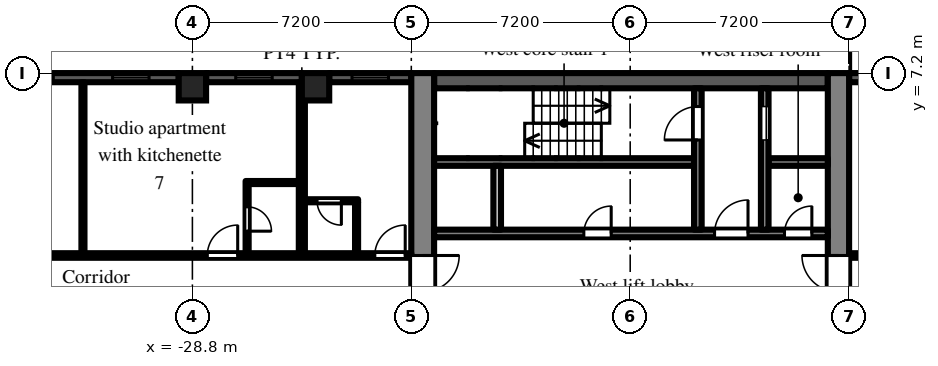
"""IFC4 building model, lengths in metres.
Left out: names, types, materials, properties, quantities, classifications, styles, units other than length and angle.
Written with IfcOpenShell. Run it as: python <this file> out.ifc"""

import sys

from ifc_helpers import new_model, si_unit, direction, frame, frame_2d, origin, origin_2d, place, context, subcontext, project, spatial, rectangle, extrude, element, fill, save


model = new_model("IFC4")
c1 = context("Model", 3, precision=1e-05, world=origin(), true_north=direction((0.0, 1.0)))
c2 = subcontext(c1, "Body", "Model", "MODEL_VIEW")
j1 = project(units=[si_unit("LENGTHUNIT", "METRE"), si_unit("PLANEANGLEUNIT", "RADIAN")], contexts=[c1])
p1 = place(None, origin())
s1 = spatial("IfcSite", under=j1, at=p1, CompositionType="ELEMENT")
p2 = place(p1, origin())
s2 = spatial("IfcBuilding", under=s1, at=p2, CompositionType="ELEMENT")
p3 = place(p2, frame((0.0, 0.0, 66.9)))
s3 = spatial("IfcBuildingStorey", under=s2, at=p3, CompositionType="ELEMENT", Elevation=66.9)
for number, where, z_axis, x_axis in (
    (1, (-28.8, 6.75, 0.0), (0.0, 0.0, 1.0), (1.0, 0.0, 0.0)),
    (2, (-24.75, 6.75, 0.0), (0.0, 0.0, 1.0), (1.0, 0.0, 0.0)),
):
    element("IfcColumn", number, at=place(p3, frame(where, z_axis=z_axis, x_axis=x_axis)), inside=s3, PredefinedType="COLUMN", context=c2, shape_type="SweptSolid", body=[
        extrude(rectangle(XDim=0.9, YDim=0.9, at=origin_2d()), origin(), (0.0, 0.0, 1.0), 3.0),
    ])
p4 = place(p3, frame((-4.2, 7.05, 0.0), z_axis=(0.0, 0.0, 1.0), x_axis=(-1.0, 0.0, 0.0)))
e3 = element("IfcWall", 3, at=p4, inside=s3, PredefinedType="SOLIDWALL", context=c2, shape_type="SweptSolid", body=[
    extrude(rectangle(XDim=3.0, YDim=0.3, at=frame_2d((1.5, 0.0))), origin(), (0.0, 0.0, 1.0), 2.1),
])
p5 = place(p3, frame((-21.6, 7.05, 0.0), z_axis=(0.0, 0.0, 1.0), x_axis=(-1.0, 0.0, 0.0)))
e4 = element("IfcWall", 4, at=p5, inside=s3, PredefinedType="SOLIDWALL", context=c2, shape_type="SweptSolid", body=[
    extrude(rectangle(XDim=2.7, YDim=0.3, at=frame_2d((1.35, 0.0))), origin(), (0.0, 0.0, 1.0), 2.1),
])
p6 = place(p5, frame((0.75, 0.0, 0.2)))
e5 = element("IfcOpeningElement", 5, at=p6, cuts=e4, PredefinedType="OPENING", context=c2, shape_type="SweptSolid", body=[
    extrude(rectangle(XDim=1.2, YDim=1.85, at=frame_2d((0.6, 0.925))), frame((0.0, 0.16, 0.0), z_axis=(0.0, -1.0, 0.0), x_axis=(1.0, 0.0, 0.0)), (0.0, 0.0, 1.0), 0.32),
])
p7 = place(p3, frame((-25.2, 7.05, 0.0), z_axis=(0.0, 0.0, 1.0), x_axis=(-1.0, 0.0, 0.0)))
e6 = element("IfcWall", 6, at=p7, inside=s3, PredefinedType="SOLIDWALL", context=c2, shape_type="SweptSolid", body=[
    extrude(rectangle(XDim=3.15, YDim=0.3, at=frame_2d((1.575, 0.0))), origin(), (0.0, 0.0, 1.0), 2.1),
])
p8 = place(p7, frame((0.975, 0.0, 0.2)))
e7 = element("IfcOpeningElement", 7, at=p8, cuts=e6, PredefinedType="OPENING", context=c2, shape_type="SweptSolid", body=[
    extrude(rectangle(XDim=1.2, YDim=1.85, at=frame_2d((0.6, 0.925))), frame((0.0, 0.16, 0.0), z_axis=(0.0, -1.0, 0.0), x_axis=(1.0, 0.0, 0.0)), (0.0, 0.0, 1.0), 0.32),
])
p9 = place(p3, frame((-29.25, 7.05, 0.0), z_axis=(0.0, 0.0, 1.0), x_axis=(-1.0, 0.0, 0.0)))
e8 = element("IfcWall", 8, at=p9, inside=s3, PredefinedType="SOLIDWALL", context=c2, shape_type="SweptSolid", body=[
    extrude(rectangle(XDim=6.3, YDim=0.3, at=frame_2d((3.15, 0.0))), origin(), (0.0, 0.0, 1.0), 2.1),
])
p10 = place(p9, frame((0.975, 0.0, 0.2)))
e9 = element("IfcOpeningElement", 9, at=p10, cuts=e8, PredefinedType="OPENING", context=c2, shape_type="SweptSolid", body=[
    extrude(rectangle(XDim=1.2, YDim=1.85, at=frame_2d((0.6, 0.925))), frame((0.0, 0.16, 0.0), z_axis=(0.0, -1.0, 0.0), x_axis=(1.0, 0.0, 0.0)), (0.0, 0.0, 1.0), 0.32),
])
p11 = place(p9, frame((4.125, 0.0, 0.2)))
e10 = element("IfcOpeningElement", 10, at=p11, cuts=e8, PredefinedType="OPENING", context=c2, shape_type="SweptSolid", body=[
    extrude(rectangle(XDim=1.2, YDim=1.85, at=frame_2d((0.6, 0.925))), frame((0.0, 0.16, 0.0), z_axis=(0.0, -1.0, 0.0), x_axis=(1.0, 0.0, 0.0)), (0.0, 0.0, 1.0), 0.32),
])
p12 = place(p3, frame((-7.55, -7.2, 0.0), z_axis=(0.0, 0.0, 1.0), x_axis=(0.0, 1.0, 0.0)))
e11 = element("IfcWall", 11, at=p12, inside=s3, PredefinedType="SHEAR", context=c2, shape_type="SweptSolid", body=[
    extrude(rectangle(XDim=14.4, YDim=0.7, at=frame_2d((7.2, 0.0))), origin(), (0.0, 0.0, 1.0), 2.575),
])
p13 = place(p12, frame((6.0, 0.0, 0.0)))
e12 = element("IfcOpeningElement", 12, at=p13, cuts=e11, PredefinedType="OPENING", context=c2, shape_type="SweptSolid", body=[
    extrude(rectangle(XDim=2.4, YDim=2.2, at=frame_2d((1.2, 1.1))), frame((0.0, 0.36, 0.0), z_axis=(0.0, -1.0, 0.0), x_axis=(1.0, 0.0, 0.0)), (0.0, 0.0, 1.0), 0.72),
])
p14 = place(p3, frame((-21.225, -7.2, 0.0), z_axis=(0.0, 0.0, 1.0), x_axis=(0.0, 1.0, 0.0)))
e13 = element("IfcWall", 13, at=p14, inside=s3, PredefinedType="SHEAR", context=c2, shape_type="SweptSolid", body=[
    extrude(rectangle(XDim=14.4, YDim=0.75, at=frame_2d((7.2, 0.0))), origin(), (0.0, 0.0, 1.0), 2.575),
])
p15 = place(p14, frame((6.0, 0.0, 0.0)))
e14 = element("IfcOpeningElement", 14, at=p15, cuts=e13, PredefinedType="OPENING", context=c2, shape_type="SweptSolid", body=[
    extrude(rectangle(XDim=2.4, YDim=2.2, at=frame_2d((1.2, 1.1))), frame((0.0, 0.385, 0.0), z_axis=(0.0, -1.0, 0.0), x_axis=(1.0, 0.0, 0.0)), (0.0, 0.0, 1.0), 0.77),
])
p16 = place(p3, frame((-7.9, 6.95, 0.0), z_axis=(0.0, 0.0, 1.0), x_axis=(-1.0, 0.0, 0.0)))
e15 = element("IfcWall", 15, at=p16, inside=s3, PredefinedType="SHEAR", context=c2, shape_type="SweptSolid", body=[
    extrude(rectangle(XDim=12.95, YDim=0.5, at=frame_2d((6.475, 0.0))), origin(), (0.0, 0.0, 1.0), 2.575),
])
p17 = place(p3, frame((-7.9, 1.925, 0.0), z_axis=(0.0, 0.0, 1.0), x_axis=(-1.0, 0.0, 0.0)))
e16 = element("IfcWall", 16, at=p17, inside=s3, PredefinedType="SHEAR", context=c2, shape_type="SweptSolid", body=[
    extrude(rectangle(XDim=12.95, YDim=0.25, at=frame_2d((6.475, 0.0))), origin(), (0.0, 0.0, 1.0), 2.575),
])
p18 = place(p17, frame((0.525, 0.0, 0.0)))
e17 = element("IfcOpeningElement", 17, at=p18, cuts=e16, PredefinedType="OPENING", context=c2, shape_type="SweptSolid", body=[
    extrude(rectangle(XDim=0.9, YDim=2.1, at=frame_2d((0.45, 1.05))), frame((0.0, 0.135, 0.0), z_axis=(0.0, -1.0, 0.0), x_axis=(1.0, 0.0, 0.0)), (0.0, 0.0, 1.0), 0.27),
])
p19 = place(p17, frame((2.625, 0.0, 0.0)))
e18 = element("IfcOpeningElement", 18, at=p19, cuts=e16, PredefinedType="OPENING", context=c2, shape_type="SweptSolid", body=[
    extrude(rectangle(XDim=1.1, YDim=2.1, at=frame_2d((0.55, 1.05))), frame((0.0, 0.135, 0.0), z_axis=(0.0, -1.0, 0.0), x_axis=(1.0, 0.0, 0.0)), (0.0, 0.0, 1.0), 0.27),
])
p20 = place(p17, frame((7.125, 0.0, 0.0)))
e19 = element("IfcOpeningElement", 19, at=p20, cuts=e16, PredefinedType="OPENING", context=c2, shape_type="SweptSolid", body=[
    extrude(rectangle(XDim=0.9, YDim=2.1, at=frame_2d((0.45, 1.05))), frame((0.0, 0.135, 0.0), z_axis=(0.0, -1.0, 0.0), x_axis=(1.0, 0.0, 0.0)), (0.0, 0.0, 1.0), 0.27),
])
p21 = place(p3, frame((-7.9, 4.275, 0.0), z_axis=(0.0, 0.0, 1.0), x_axis=(-1.0, 0.0, 0.0)))
e20 = element("IfcWall", 20, at=p21, inside=s3, PredefinedType="SHEAR", context=c2, shape_type="SweptSolid", body=[
    extrude(rectangle(XDim=1.95, YDim=0.25, at=frame_2d((0.975, 0.0))), origin(), (0.0, 0.0, 1.0), 2.575),
])
p22 = place(p3, frame((-12.3, 4.275, 0.0), z_axis=(0.0, 0.0, 1.0), x_axis=(-1.0, 0.0, 0.0)))
e21 = element("IfcWall", 21, at=p22, inside=s3, PredefinedType="SHEAR", context=c2, shape_type="SweptSolid", body=[
    extrude(rectangle(XDim=8.55, YDim=0.25, at=frame_2d((4.275, 0.0))), origin(), (0.0, 0.0, 1.0), 2.575),
])
p23 = place(p3, frame((-9.975, 2.05, 0.0), z_axis=(0.0, 0.0, 1.0), x_axis=(0.0, 1.0, 0.0)))
e22 = element("IfcWall", 22, at=p23, inside=s3, PredefinedType="SHEAR", context=c2, shape_type="SweptSolid", body=[
    extrude(rectangle(XDim=4.65, YDim=0.25, at=frame_2d((2.325, 0.0))), origin(), (0.0, 0.0, 1.0), 2.575),
])
p24 = place(p23, frame((2.95, 0.0, 0.0)))
e23 = element("IfcOpeningElement", 23, at=p24, cuts=e22, PredefinedType="OPENING", context=c2, shape_type="SweptSolid", body=[
    extrude(rectangle(XDim=1.1, YDim=2.1, at=frame_2d((0.55, 1.05))), frame((0.0, 0.135, 0.0), z_axis=(0.0, -1.0, 0.0), x_axis=(1.0, 0.0, 0.0)), (0.0, 0.0, 1.0), 0.27),
])
p25 = place(p3, frame((-12.175, 2.05, 0.0), z_axis=(0.0, 0.0, 1.0), x_axis=(0.0, 1.0, 0.0)))
e24 = element("IfcWall", 24, at=p25, inside=s3, PredefinedType="SHEAR", context=c2, shape_type="SweptSolid", body=[
    extrude(rectangle(XDim=4.65, YDim=0.25, at=frame_2d((2.325, 0.0))), origin(), (0.0, 0.0, 1.0), 2.575),
])
p26 = place(p25, frame((2.95, 0.0, 0.0)))
e25 = element("IfcOpeningElement", 25, at=p26, cuts=e24, PredefinedType="OPENING", context=c2, shape_type="SweptSolid", body=[
    extrude(rectangle(XDim=1.1, YDim=2.1, at=frame_2d((0.55, 1.05))), frame((0.0, 0.135, 0.0), z_axis=(0.0, -1.0, 0.0), x_axis=(1.0, 0.0, 0.0)), (0.0, 0.0, 1.0), 0.27),
])
p27 = place(p3, frame((-18.775, 2.05, 0.0), z_axis=(0.0, 0.0, 1.0), x_axis=(0.0, 1.0, 0.0)))
e26 = element("IfcWall", 26, at=p27, inside=s3, PredefinedType="PARTITIONING", context=c2, shape_type="SweptSolid", body=[
    extrude(rectangle(XDim=2.1, YDim=0.25, at=frame_2d((1.05, 0.0))), origin(), (0.0, 0.0, 1.0), 2.575),
])
p28 = place(p3, frame((-36.5, 1.2, 0.0), z_axis=(0.0, 0.0, 1.0), x_axis=(1.0, 0.0, 0.0)))
e27 = element("IfcWall", 27, at=p28, inside=s3, PredefinedType="PARTITIONING", context=c2, shape_type="SweptSolid", body=[
    extrude(rectangle(XDim=14.9, YDim=0.15, at=frame_2d((7.45, 0.0))), origin(), (0.0, 0.0, 1.0), 2.575),
])
p29 = place(p28, frame((13.7, 0.0, 0.0)))
e28 = element("IfcOpeningElement", 28, at=p29, cuts=e27, PredefinedType="OPENING", context=c2, shape_type="SweptSolid", body=[
    extrude(rectangle(XDim=1.0, YDim=2.1, at=frame_2d((0.5, 1.05))), frame((0.0, 0.085, 0.0), z_axis=(0.0, -1.0, 0.0), x_axis=(1.0, 0.0, 0.0)), (0.0, 0.0, 1.0), 0.17),
])
p30 = place(p28, frame((8.19, 0.0, 0.0)))
e29 = element("IfcOpeningElement", 29, at=p30, cuts=e27, PredefinedType="OPENING", context=c2, shape_type="SweptSolid", body=[
    extrude(rectangle(XDim=1.0, YDim=2.1, at=frame_2d((0.5, 1.05))), frame((0.0, 0.085, 0.0), z_axis=(0.0, -1.0, 0.0), x_axis=(1.0, 0.0, 0.0)), (0.0, 0.0, 1.0), 0.17),
])
p31 = place(p28, frame((1.15, 0.0, 0.0)))
e30 = element("IfcOpeningElement", 30, at=p31, cuts=e27, PredefinedType="OPENING", context=c2, shape_type="SweptSolid", body=[
    extrude(rectangle(XDim=1.8, YDim=2.1, at=frame_2d((0.9, 1.05))), frame((0.0, 0.085, 0.0), z_axis=(0.0, -1.0, 0.0), x_axis=(1.0, 0.0, 0.0)), (0.0, 0.0, 1.0), 0.17),
])
p32 = place(p3, frame((-32.4, 1.275, 0.0), z_axis=(0.0, 0.0, 1.0), x_axis=(0.0, 1.0, 0.0)))
e31 = element("IfcWall", 31, at=p32, inside=s3, PredefinedType="PARTITIONING", context=c2, shape_type="SweptSolid", body=[
    extrude(rectangle(XDim=5.625, YDim=0.1, at=frame_2d((2.812, 0.0))), origin(), (0.0, 0.0, 1.0), 2.575),
])
p33 = place(p3, frame((-27.0, 1.275, 0.0), z_axis=(0.0, 0.0, 1.0), x_axis=(0.0, 1.0, 0.0)))
e32 = element("IfcWall", 32, at=p33, inside=s3, PredefinedType="PARTITIONING", context=c2, shape_type="SweptSolid", body=[
    extrude(rectangle(XDim=2.375, YDim=0.1, at=frame_2d((1.188, 0.0))), origin(), (0.0, 0.0, 1.0), 2.575),
])
p34 = place(p33, frame((0.725, 0.0, 0.0)))
e33 = element("IfcOpeningElement", 33, at=p34, cuts=e32, PredefinedType="OPENING", context=c2, shape_type="SweptSolid", body=[
    extrude(rectangle(XDim=0.8, YDim=2.1, at=frame_2d((0.4, 1.05))), frame((0.0, 0.06, 0.0), z_axis=(0.0, -1.0, 0.0), x_axis=(1.0, 0.0, 0.0)), (0.0, 0.0, 1.0), 0.12),
])
p35 = place(p3, frame((-26.95, 3.6, 0.0), z_axis=(0.0, 0.0, 1.0), x_axis=(1.0, 0.0, 0.0)))
e34 = element("IfcWall", 34, at=p35, inside=s3, PredefinedType="PARTITIONING", context=c2, shape_type="SweptSolid", body=[
    extrude(rectangle(XDim=1.65, YDim=0.1, at=frame_2d((0.825, 0.0))), origin(), (0.0, 0.0, 1.0), 2.575),
])
p36 = place(p3, frame((-25.2, 1.275, 0.0), z_axis=(0.0, 0.0, 1.0), x_axis=(0.0, 1.0, 0.0)))
e35 = element("IfcWall", 35, at=p36, inside=s3, PredefinedType="PARTITIONING", context=c2, shape_type="SweptSolid", body=[
    extrude(rectangle(XDim=5.625, YDim=0.2, at=frame_2d((2.812, 0.0))), origin(), (0.0, 0.0, 1.0), 2.575),
])
p37 = place(p3, frame((-25.1, 3.0, 0.0), z_axis=(0.0, 0.0, 1.0), x_axis=(1.0, 0.0, 0.0)))
e36 = element("IfcWall", 36, at=p37, inside=s3, PredefinedType="PARTITIONING", context=c2, shape_type="SweptSolid", body=[
    extrude(rectangle(XDim=1.75, YDim=0.1, at=frame_2d((0.875, 0.0))), origin(), (0.0, 0.0, 1.0), 2.575),
])
p38 = place(p37, frame((0.4, 0.0, 0.0)))
e37 = element("IfcOpeningElement", 37, at=p38, cuts=e36, PredefinedType="OPENING", context=c2, shape_type="SweptSolid", body=[
    extrude(rectangle(XDim=0.8, YDim=2.1, at=frame_2d((0.4, 1.05))), frame((0.0, 0.06, 0.0), z_axis=(0.0, -1.0, 0.0), x_axis=(1.0, 0.0, 0.0)), (0.0, 0.0, 1.0), 0.12),
])
p39 = place(p3, frame((-23.4, 1.275, 0.0), z_axis=(0.0, 0.0, 1.0), x_axis=(0.0, 1.0, 0.0)))
e38 = element("IfcWall", 38, at=p39, inside=s3, PredefinedType="PARTITIONING", context=c2, shape_type="SweptSolid", body=[
    extrude(rectangle(XDim=1.675, YDim=0.1, at=frame_2d((0.837, 0.0))), origin(), (0.0, 0.0, 1.0), 2.575),
])
p40 = place(p3, frame((-7.2, 1.2, 0.0), z_axis=(0.0, 0.0, 1.0), x_axis=(1.0, 0.0, 0.0)))
e39 = element("IfcWall", 39, at=p40, inside=s3, PredefinedType="PARTITIONING", context=c2, shape_type="SweptSolid", body=[
    extrude(rectangle(XDim=6.075, YDim=0.15, at=frame_2d((3.038, 0.0))), origin(), (0.0, 0.0, 1.0), 2.575),
])
p41 = place(p40, frame((1.95, 0.0, 0.0)))
e40 = element("IfcOpeningElement", 40, at=p41, cuts=e39, PredefinedType="OPENING", context=c2, shape_type="SweptSolid", body=[
    extrude(rectangle(XDim=0.9, YDim=2.1, at=frame_2d((0.45, 1.05))), frame((0.0, 0.085, 0.0), z_axis=(0.0, -1.0, 0.0), x_axis=(1.0, 0.0, 0.0)), (0.0, 0.0, 1.0), 0.17),
])
p42 = place(p6, origin())
e41 = element("IfcWindow", 41, at=p42, inside=s3, PartitioningType="SINGLE_PANEL", PredefinedType="WINDOW", context=c2, shape_type="SweptSolid", body=[
    extrude(rectangle(XDim=1.2, YDim=1.85, at=frame_2d((0.6, 0.925))), frame((0.0, 0.03, 0.0), z_axis=(0.0, -1.0, 0.0), x_axis=(1.0, 0.0, 0.0)), (0.0, 0.0, 1.0), 0.06),
])
fill(e5, e41)
p43 = place(p8, origin())
e42 = element("IfcWindow", 42, at=p43, inside=s3, PartitioningType="SINGLE_PANEL", PredefinedType="WINDOW", context=c2, shape_type="SweptSolid", body=[
    extrude(rectangle(XDim=1.2, YDim=1.85, at=frame_2d((0.6, 0.925))), frame((0.0, 0.03, 0.0), z_axis=(0.0, -1.0, 0.0), x_axis=(1.0, 0.0, 0.0)), (0.0, 0.0, 1.0), 0.06),
])
fill(e7, e42)
p44 = place(p10, origin())
e43 = element("IfcWindow", 43, at=p44, inside=s3, PartitioningType="SINGLE_PANEL", PredefinedType="WINDOW", context=c2, shape_type="SweptSolid", body=[
    extrude(rectangle(XDim=1.2, YDim=1.85, at=frame_2d((0.6, 0.925))), frame((0.0, 0.03, 0.0), z_axis=(0.0, -1.0, 0.0), x_axis=(1.0, 0.0, 0.0)), (0.0, 0.0, 1.0), 0.06),
])
fill(e9, e43)
p45 = place(p11, origin())
e44 = element("IfcWindow", 44, at=p45, inside=s3, PartitioningType="SINGLE_PANEL", PredefinedType="WINDOW", context=c2, shape_type="SweptSolid", body=[
    extrude(rectangle(XDim=1.2, YDim=1.85, at=frame_2d((0.6, 0.925))), frame((0.0, 0.03, 0.0), z_axis=(0.0, -1.0, 0.0), x_axis=(1.0, 0.0, 0.0)), (0.0, 0.0, 1.0), 0.06),
])
fill(e10, e44)
p46 = place(p24, origin())
e45 = element("IfcDoor", 45, at=p46, inside=s3, OperationType="SLIDING_TO_LEFT", PredefinedType="DOOR", context=c2, shape_type="SweptSolid", body=[
    extrude(rectangle(XDim=1.1, YDim=2.1, at=frame_2d((0.55, 1.05))), frame((0.0, 0.025, 0.0), z_axis=(0.0, -1.0, 0.0), x_axis=(1.0, 0.0, 0.0)), (0.0, 0.0, 1.0), 0.05),
])
fill(e23, e45)
p47 = place(p26, origin())
e46 = element("IfcDoor", 46, at=p47, inside=s3, OperationType="SINGLE_SWING_LEFT", PredefinedType="DOOR", context=c2, shape_type="SweptSolid", body=[
    extrude(rectangle(XDim=1.1, YDim=2.1, at=frame_2d((0.55, 1.05))), frame((0.0, 0.025, 0.0), z_axis=(0.0, -1.0, 0.0), x_axis=(1.0, 0.0, 0.0)), (0.0, 0.0, 1.0), 0.05),
])
fill(e25, e46)
p48 = place(p18, frame((0.9, 0.0, 0.0), z_axis=(0.0, 0.0, 1.0), x_axis=(-1.0, 0.0, 0.0)))
e47 = element("IfcDoor", 47, at=p48, inside=s3, OperationType="SINGLE_SWING_RIGHT", PredefinedType="DOOR", context=c2, shape_type="SweptSolid", body=[
    extrude(rectangle(XDim=0.9, YDim=2.1, at=frame_2d((0.45, 1.05))), frame((0.0, 0.025, 0.0), z_axis=(0.0, -1.0, 0.0), x_axis=(1.0, 0.0, 0.0)), (0.0, 0.0, 1.0), 0.05),
])
fill(e17, e47)
p49 = place(p19, frame((1.1, 0.0, 0.0), z_axis=(0.0, 0.0, 1.0), x_axis=(-1.0, 0.0, 0.0)))
e48 = element("IfcDoor", 48, at=p49, inside=s3, OperationType="SINGLE_SWING_RIGHT", PredefinedType="DOOR", context=c2, shape_type="SweptSolid", body=[
    extrude(rectangle(XDim=1.1, YDim=2.1, at=frame_2d((0.55, 1.05))), frame((0.0, 0.025, 0.0), z_axis=(0.0, -1.0, 0.0), x_axis=(1.0, 0.0, 0.0)), (0.0, 0.0, 1.0), 0.05),
])
fill(e18, e48)
p50 = place(p13, origin())
e49 = element("IfcDoor", 49, at=p50, inside=s3, OperationType="DOUBLE_DOOR_DOUBLE_SWING", PredefinedType="DOOR", context=c2, shape_type="SweptSolid", body=[
    extrude(rectangle(XDim=2.4, YDim=2.2, at=frame_2d((1.2, 1.1))), frame((0.0, 0.025, 0.0), z_axis=(0.0, -1.0, 0.0), x_axis=(1.0, 0.0, 0.0)), (0.0, 0.0, 1.0), 0.05),
])
fill(e12, e49)
p51 = place(p15, frame((2.4, 0.0, 0.0), z_axis=(0.0, 0.0, 1.0), x_axis=(-1.0, 0.0, 0.0)))
e50 = element("IfcDoor", 50, at=p51, inside=s3, OperationType="DOUBLE_DOOR_DOUBLE_SWING", PredefinedType="DOOR", context=c2, shape_type="SweptSolid", body=[
    extrude(rectangle(XDim=2.4, YDim=2.2, at=frame_2d((1.2, 1.1))), frame((0.0, 0.025, 0.0), z_axis=(0.0, -1.0, 0.0), x_axis=(1.0, 0.0, 0.0)), (0.0, 0.0, 1.0), 0.05),
])
fill(e14, e50)
p52 = place(p20, frame((0.9, 0.0, 0.0), z_axis=(0.0, 0.0, 1.0), x_axis=(-1.0, 0.0, 0.0)))
e51 = element("IfcDoor", 51, at=p52, inside=s3, OperationType="SINGLE_SWING_RIGHT", PredefinedType="DOOR", context=c2, shape_type="SweptSolid", body=[
    extrude(rectangle(XDim=0.9, YDim=2.1, at=frame_2d((0.45, 1.05))), frame((0.0, 0.025, 0.0), z_axis=(0.0, -1.0, 0.0), x_axis=(1.0, 0.0, 0.0)), (0.0, 0.0, 1.0), 0.05),
])
fill(e19, e51)
p53 = place(p38, frame((0.8, 0.0, 0.0), z_axis=(0.0, 0.0, 1.0), x_axis=(-1.0, 0.0, 0.0)))
e52 = element("IfcDoor", 52, at=p53, inside=s3, OperationType="SINGLE_SWING_LEFT", PredefinedType="DOOR", context=c2, shape_type="SweptSolid", body=[
    extrude(rectangle(XDim=0.8, YDim=2.1, at=frame_2d((0.4, 1.05))), frame((0.0, 0.025, 0.0), z_axis=(0.0, -1.0, 0.0), x_axis=(1.0, 0.0, 0.0)), (0.0, 0.0, 1.0), 0.05),
])
fill(e37, e52)
p54 = place(p29, origin())
e53 = element("IfcDoor", 53, at=p54, inside=s3, OperationType="SINGLE_SWING_RIGHT", PredefinedType="DOOR", context=c2, shape_type="SweptSolid", body=[
    extrude(rectangle(XDim=1.0, YDim=2.1, at=frame_2d((0.5, 1.05))), frame((0.0, 0.025, 0.0), z_axis=(0.0, -1.0, 0.0), x_axis=(1.0, 0.0, 0.0)), (0.0, 0.0, 1.0), 0.05),
])
fill(e28, e53)
p55 = place(p34, frame((0.8, 0.0, 0.0), z_axis=(0.0, 0.0, 1.0), x_axis=(-1.0, 0.0, 0.0)))
e54 = element("IfcDoor", 54, at=p55, inside=s3, OperationType="SINGLE_SWING_RIGHT", PredefinedType="DOOR", context=c2, shape_type="SweptSolid", body=[
    extrude(rectangle(XDim=0.8, YDim=2.1, at=frame_2d((0.4, 1.05))), frame((0.0, 0.025, 0.0), z_axis=(0.0, -1.0, 0.0), x_axis=(1.0, 0.0, 0.0)), (0.0, 0.0, 1.0), 0.05),
])
fill(e33, e54)
p56 = place(p30, origin())
e55 = element("IfcDoor", 55, at=p56, inside=s3, OperationType="SINGLE_SWING_RIGHT", PredefinedType="DOOR", context=c2, shape_type="SweptSolid", body=[
    extrude(rectangle(XDim=1.0, YDim=2.1, at=frame_2d((0.5, 1.05))), frame((0.0, 0.025, 0.0), z_axis=(0.0, -1.0, 0.0), x_axis=(1.0, 0.0, 0.0)), (0.0, 0.0, 1.0), 0.05),
])
fill(e29, e55)
save(model, sys.argv[1])
